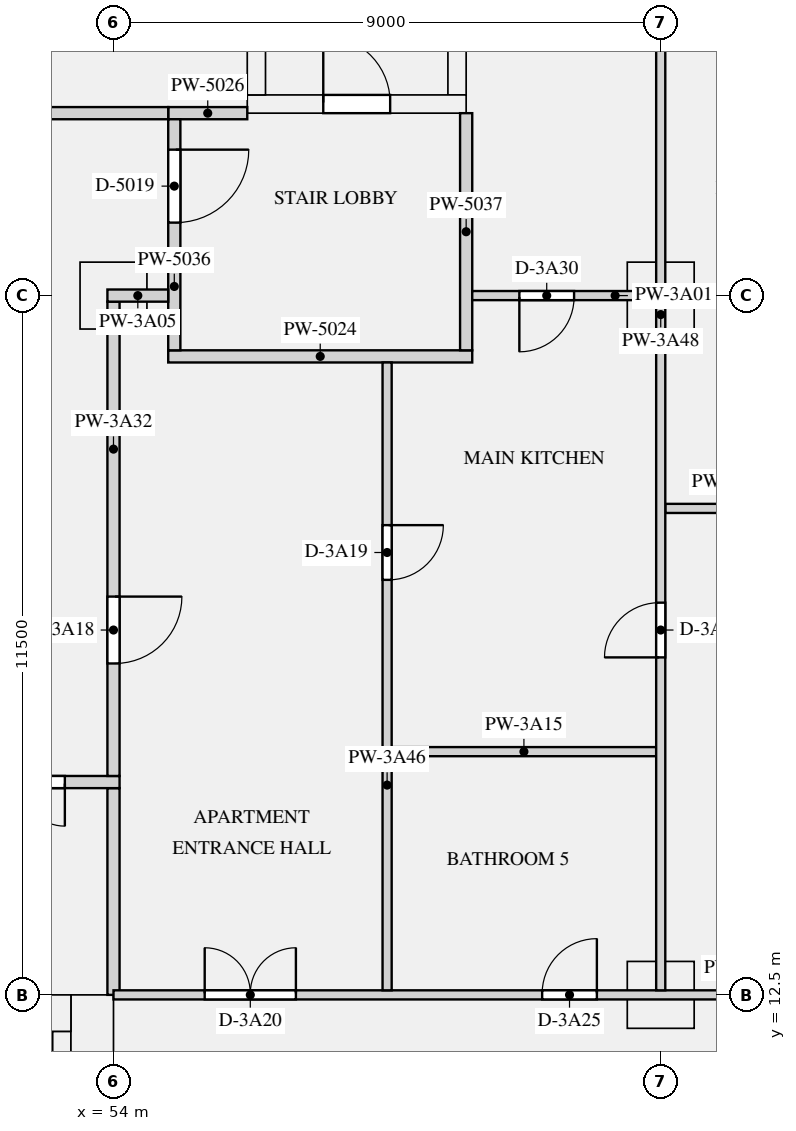
"""IFC4 building model, lengths in metres.
Left out: names, types, materials, properties, quantities, classifications, styles, units other than length and angle.
Written with IfcOpenShell. Run it as: python <this file> out.ifc"""

import sys

from ifc_helpers import new_model, si_unit, direction, frame, frame_2d, origin, origin_2d, place, context, subcontext, project, spatial, rectangle, extrude, element, fill, save


model = new_model("IFC4")
c1 = context("Model", 3, precision=1e-05, world=origin(), true_north=direction((0.0, 1.0)))
c2 = subcontext(c1, "Body", "Model", "MODEL_VIEW")
j1 = project(units=[si_unit("LENGTHUNIT", "METRE"), si_unit("PLANEANGLEUNIT", "RADIAN")], contexts=[c1])
p1 = place(None, origin())
s1 = spatial("IfcSite", under=j1, at=p1, CompositionType="ELEMENT")
p2 = place(p1, origin())
s2 = spatial("IfcBuilding", under=s1, at=p2, CompositionType="ELEMENT")
p3 = place(p2, frame((0.0, 0.0, 141.3)))
s3 = spatial("IfcBuildingStorey", under=s2, at=p3, CompositionType="ELEMENT", Elevation=141.3)
for number, where, z_axis, x_axis in (
    (1, (54.0, 24.0, 0.0), (0.0, 0.0, 1.0), (1.0, 0.0, 0.0)),
    (2, (63.0, 24.0, 0.0), (0.0, 0.0, 1.0), (1.0, 0.0, 0.0)),
    (3, (63.0, 12.5, 0.0), (0.0, 0.0, 1.0), (1.0, 0.0, 0.0)),
):
    element("IfcColumn", number, at=place(p3, frame(where, z_axis=z_axis, x_axis=x_axis)), inside=s3, PredefinedType="COLUMN", context=c2, shape_type="SweptSolid", body=[
        extrude(rectangle(XDim=1.1, YDim=1.1, at=origin_2d()), origin(), (0.0, 0.0, 1.0), 3.15),
    ])
p4 = place(p3, frame((53.65, 0.0, 0.0), z_axis=(0.0, 0.0, 1.0), x_axis=(0.0, 1.0, 0.0)))
e4 = element("IfcWall", 4, at=p4, inside=s3, PredefinedType="SHEAR", context=c2, shape_type="SweptSolid", body=[
    extrude(rectangle(XDim=12.5, YDim=0.7, at=frame_2d((6.25, 0.0))), origin(), (0.0, 0.0, 1.0), 3.15),
])
p5 = place(p3, frame((18.7, 12.2, 0.0), z_axis=(0.0, 0.0, 1.0), x_axis=(1.0, 0.0, 0.0)))
e5 = element("IfcWall", 5, at=p5, inside=s3, PredefinedType="SHEAR", context=c2, shape_type="SweptSolid", body=[
    extrude(rectangle(XDim=34.6, YDim=0.6, at=frame_2d((17.3, 0.0))), origin(), (0.0, 0.0, 1.0), 3.15),
])
p6 = place(p5, frame((24.475, 0.0, 0.0)))
e6 = element("IfcOpeningElement", 6, at=p6, cuts=e5, PredefinedType="OPENING", context=c2, shape_type="SweptSolid", body=[
    extrude(rectangle(XDim=1.1, YDim=2.1, at=frame_2d((0.55, 1.05))), frame((0.0, 0.31, 0.0), z_axis=(0.0, -1.0, 0.0), x_axis=(1.0, 0.0, 0.0)), (0.0, 0.0, 1.0), 0.62),
])
p7 = place(p5, frame((26.725, 0.0, 0.0)))
e7 = element("IfcOpeningElement", 7, at=p7, cuts=e5, PredefinedType="OPENING", context=c2, shape_type="SweptSolid", body=[
    extrude(rectangle(XDim=1.1, YDim=2.1, at=frame_2d((0.55, 1.05))), frame((0.0, 0.31, 0.0), z_axis=(0.0, -1.0, 0.0), x_axis=(1.0, 0.0, 0.0)), (0.0, 0.0, 1.0), 0.62),
])
p8 = place(p5, frame((28.975, 0.0, 0.0)))
e8 = element("IfcOpeningElement", 8, at=p8, cuts=e5, PredefinedType="OPENING", context=c2, shape_type="SweptSolid", body=[
    extrude(rectangle(XDim=1.1, YDim=2.1, at=frame_2d((0.55, 1.05))), frame((0.0, 0.31, 0.0), z_axis=(0.0, -1.0, 0.0), x_axis=(1.0, 0.0, 0.0)), (0.0, 0.0, 1.0), 0.62),
])
p9 = place(p5, frame((14.35, 0.0, 0.0)))
e9 = element("IfcOpeningElement", 9, at=p9, cuts=e5, PredefinedType="OPENING", context=c2, shape_type="SweptSolid", body=[
    extrude(rectangle(XDim=0.9, YDim=2.1, at=frame_2d((0.45, 1.05))), frame((0.0, 0.31, 0.0), z_axis=(0.0, -1.0, 0.0), x_axis=(1.0, 0.0, 0.0)), (0.0, 0.0, 1.0), 0.62),
])
p10 = place(p5, frame((1.45, 0.0, 0.0)))
e10 = element("IfcOpeningElement", 10, at=p10, cuts=e5, PredefinedType="OPENING", context=c2, shape_type="SweptSolid", body=[
    extrude(rectangle(XDim=1.2, YDim=2.1, at=frame_2d((0.6, 1.05))), frame((0.0, 0.31, 0.0), z_axis=(0.0, -1.0, 0.0), x_axis=(1.0, 0.0, 0.0)), (0.0, 0.0, 1.0), 0.62),
])
p11 = place(p5, frame((31.95, 0.0, 0.0)))
e11 = element("IfcOpeningElement", 11, at=p11, cuts=e5, PredefinedType="OPENING", context=c2, shape_type="SweptSolid", body=[
    extrude(rectangle(XDim=1.2, YDim=2.1, at=frame_2d((0.6, 1.05))), frame((0.0, 0.31, 0.0), z_axis=(0.0, -1.0, 0.0), x_axis=(1.0, 0.0, 0.0)), (0.0, 0.0, 1.0), 0.62),
])
p12 = place(p3, frame((53.15, 1.0, 0.0), z_axis=(0.0, 0.0, 1.0), x_axis=(0.0, 1.0, 0.0)))
e12 = element("IfcWall", 12, at=p12, inside=s3, PredefinedType="SHEAR", context=c2, shape_type="SweptSolid", body=[
    extrude(rectangle(XDim=10.9, YDim=0.3, at=frame_2d((5.45, 0.0))), origin(), (0.0, 0.0, 1.0), 3.15),
])
p13 = place(p3, frame((56.2, 27.15, 0.0), z_axis=(0.0, 0.0, 1.0), x_axis=(1.0, 0.0, 0.0)))
e13 = element("IfcWall", 13, at=p13, inside=s3, PredefinedType="SHEAR", context=c2, shape_type="SweptSolid", body=[
    extrude(rectangle(XDim=3.6, YDim=0.3, at=frame_2d((1.8, 0.0))), origin(), (0.0, 0.0, 1.0), 3.15),
])
p14 = place(p13, frame((1.25, 0.0, 0.0)))
e14 = element("IfcOpeningElement", 14, at=p14, cuts=e13, PredefinedType="OPENING", context=c2, shape_type="SweptSolid", body=[
    extrude(rectangle(XDim=1.1, YDim=2.1, at=frame_2d((0.55, 1.05))), frame((0.0, 0.16, 0.0), z_axis=(0.0, -1.0, 0.0), x_axis=(1.0, 0.0, 0.0)), (0.0, 0.0, 1.0), 0.32),
])
for number, where, z_axis, x_axis in (
    (15, (56.35, 27.3, 0.0), (0.0, 0.0, 1.0), (0.0, 1.0, 0.0)),
    (16, (59.65, 27.3, 0.0), (0.0, 0.0, 1.0), (0.0, 1.0, 0.0)),
):
    element("IfcWall", number, at=place(p3, frame(where, z_axis=z_axis, x_axis=x_axis)), inside=s3, PredefinedType="SHEAR", context=c2, shape_type="SweptSolid", body=[
        extrude(rectangle(XDim=7.8, YDim=0.3, at=frame_2d((3.9, 0.0))), origin(), (0.0, 0.0, 1.0), 3.15),
    ])
p15 = place(p3, frame((54.9, 23.0, 0.0), z_axis=(0.0, 0.0, 1.0), x_axis=(1.0, 0.0, 0.0)))
e17 = element("IfcWall", 17, at=p15, inside=s3, PredefinedType="PARTITIONING", context=c2, shape_type="SweptSolid", body=[
    extrude(rectangle(XDim=5.0, YDim=0.2, at=frame_2d((2.5, 0.0))), origin(), (0.0, 0.0, 1.0), 2.83),
])
p16 = place(p3, frame((54.9, 27.0, 0.0), z_axis=(0.0, 0.0, 1.0), x_axis=(1.0, 0.0, 0.0)))
e18 = element("IfcWall", 18, at=p16, inside=s3, PredefinedType="PARTITIONING", context=c2, shape_type="SweptSolid", body=[
    extrude(rectangle(XDim=1.3, YDim=0.2, at=frame_2d((0.65, 0.0))), origin(), (0.0, 0.0, 1.0), 2.83),
])
p17 = place(p3, frame((54.0, 12.5, 0.0), z_axis=(0.0, 0.0, 1.0), x_axis=(0.0, 1.0, 0.0)))
e19 = element("IfcWall", 19, at=p17, inside=s3, PredefinedType="PARTITIONING", context=c2, shape_type="SweptSolid", body=[
    extrude(rectangle(XDim=3.4, YDim=0.2, at=frame_2d((1.7, 0.0))), origin(), (0.0, 0.0, 1.0), 2.83),
])
p18 = place(p3, frame((55.0, 23.1, 0.0), z_axis=(0.0, 0.0, 1.0), x_axis=(0.0, 1.0, 0.0)))
e20 = element("IfcWall", 20, at=p18, inside=s3, PredefinedType="PARTITIONING", context=c2, shape_type="SweptSolid", body=[
    extrude(rectangle(XDim=3.8, YDim=0.2, at=frame_2d((1.9, 0.0))), origin(), (0.0, 0.0, 1.0), 2.83),
])
p19 = place(p18, frame((2.1, 0.0, 0.0)))
e21 = element("IfcOpeningElement", 21, at=p19, cuts=e20, PredefinedType="OPENING", context=c2, shape_type="SweptSolid", body=[
    extrude(rectangle(XDim=1.2, YDim=2.1, at=frame_2d((0.6, 1.05))), frame((0.0, 0.11, 0.0), z_axis=(0.0, -1.0, 0.0), x_axis=(1.0, 0.0, 0.0)), (0.0, 0.0, 1.0), 0.22),
])
p20 = place(p3, frame((59.8, 23.1, 0.0), z_axis=(0.0, 0.0, 1.0), x_axis=(0.0, 1.0, 0.0)))
e22 = element("IfcWall", 22, at=p20, inside=s3, PredefinedType="PARTITIONING", context=c2, shape_type="SweptSolid", body=[
    extrude(rectangle(XDim=3.9, YDim=0.2, at=frame_2d((1.95, 0.0))), origin(), (0.0, 0.0, 1.0), 2.83),
])
p21 = place(p3, frame((59.9, 24.0, 0.0), z_axis=(0.0, 0.0, 1.0), x_axis=(1.0, 0.0, 0.0)))
e23 = element("IfcWall", 23, at=p21, inside=s3, PredefinedType="PARTITIONING", context=c2, shape_type="SweptSolid", body=[
    extrude(rectangle(XDim=3.025, YDim=0.15, at=frame_2d((1.513, 0.0))), origin(), (0.0, 0.0, 1.0), 2.83),
])
p22 = place(p21, frame((0.775, 0.0, 0.0)))
e24 = element("IfcOpeningElement", 24, at=p22, cuts=e23, PredefinedType="OPENING", context=c2, shape_type="SweptSolid", body=[
    extrude(rectangle(XDim=0.9, YDim=2.1, at=frame_2d((0.45, 1.05))), frame((0.0, 0.085, 0.0), z_axis=(0.0, -1.0, 0.0), x_axis=(1.0, 0.0, 0.0)), (0.0, 0.0, 1.0), 0.17),
])
p23 = place(p3, frame((53.9, 24.0, 0.0), z_axis=(0.0, 0.0, 1.0), x_axis=(1.0, 0.0, 0.0)))
e25 = element("IfcWall", 25, at=p23, inside=s3, PredefinedType="PARTITIONING", context=c2, shape_type="SweptSolid", body=[
    extrude(rectangle(XDim=1.0, YDim=0.2, at=frame_2d((0.5, 0.0))), origin(), (0.0, 0.0, 1.0), 2.83),
])
p24 = place(p3, frame((47.925, 27.0, 0.0), z_axis=(0.0, 0.0, 1.0), x_axis=(1.0, 0.0, 0.0)))
e26 = element("IfcWall", 26, at=p24, inside=s3, PredefinedType="PARTITIONING", context=c2, shape_type="SweptSolid", body=[
    extrude(rectangle(XDim=6.975, YDim=0.2, at=frame_2d((3.487, 0.0))), origin(), (0.0, 0.0, 1.0), 2.83),
])
p25 = place(p3, frame((54.0, 12.5, 0.0), z_axis=(0.0, 0.0, 1.0), x_axis=(1.0, 0.0, 0.0)))
e27 = element("IfcWall", 27, at=p25, inside=s3, PredefinedType="PARTITIONING", context=c2, shape_type="SweptSolid", body=[
    extrude(rectangle(XDim=17.3, YDim=0.15, at=frame_2d((8.65, 0.0))), origin(), (0.0, 0.0, 1.0), 2.83),
])
p26 = place(p25, frame((1.5, 0.0, 0.0)))
e28 = element("IfcOpeningElement", 28, at=p26, cuts=e27, PredefinedType="OPENING", context=c2, shape_type="SweptSolid", body=[
    extrude(rectangle(XDim=1.5, YDim=2.1, at=frame_2d((0.75, 1.05))), frame((0.0, 0.085, 0.0), z_axis=(0.0, -1.0, 0.0), x_axis=(1.0, 0.0, 0.0)), (0.0, 0.0, 1.0), 0.17),
])
p27 = place(p25, frame((7.05, 0.0, 0.0)))
e29 = element("IfcOpeningElement", 29, at=p27, cuts=e27, PredefinedType="OPENING", context=c2, shape_type="SweptSolid", body=[
    extrude(rectangle(XDim=0.9, YDim=2.1, at=frame_2d((0.45, 1.05))), frame((0.0, 0.085, 0.0), z_axis=(0.0, -1.0, 0.0), x_axis=(1.0, 0.0, 0.0)), (0.0, 0.0, 1.0), 0.17),
])
p28 = place(p25, frame((12.75, 0.0, 0.0)))
e30 = element("IfcOpeningElement", 30, at=p28, cuts=e27, PredefinedType="OPENING", context=c2, shape_type="SweptSolid", body=[
    extrude(rectangle(XDim=1.5, YDim=2.1, at=frame_2d((0.75, 1.05))), frame((0.0, 0.085, 0.0), z_axis=(0.0, -1.0, 0.0), x_axis=(1.0, 0.0, 0.0)), (0.0, 0.0, 1.0), 0.17),
])
p29 = place(p3, frame((58.575, 16.5, 0.0), z_axis=(0.0, 0.0, 1.0), x_axis=(1.0, 0.0, 0.0)))
e31 = element("IfcWall", 31, at=p29, inside=s3, PredefinedType="PARTITIONING", context=c2, shape_type="SweptSolid", body=[
    extrude(rectangle(XDim=4.35, YDim=0.15, at=frame_2d((2.175, 0.0))), origin(), (0.0, 0.0, 1.0), 2.83),
])
p30 = place(p3, frame((63.075, 20.5, 0.0), z_axis=(0.0, 0.0, 1.0), x_axis=(1.0, 0.0, 0.0)))
e32 = element("IfcWall", 32, at=p30, inside=s3, PredefinedType="PARTITIONING", context=c2, shape_type="SweptSolid", body=[
    extrude(rectangle(XDim=5.725, YDim=0.15, at=frame_2d((2.863, 0.0))), origin(), (0.0, 0.0, 1.0), 2.83),
])
p31 = place(p30, frame((2.15, 0.0, 0.0)))
e33 = element("IfcOpeningElement", 33, at=p31, cuts=e32, PredefinedType="OPENING", context=c2, shape_type="SweptSolid", body=[
    extrude(rectangle(XDim=1.5, YDim=2.1, at=frame_2d((0.75, 1.05))), frame((0.0, 0.085, 0.0), z_axis=(0.0, -1.0, 0.0), x_axis=(1.0, 0.0, 0.0)), (0.0, 0.0, 1.0), 0.17),
])
p32 = place(p3, frame((17.9, 16.0, 0.0), z_axis=(0.0, 0.0, 1.0), x_axis=(1.0, 0.0, 0.0)))
e34 = element("IfcWall", 34, at=p32, inside=s3, PredefinedType="PARTITIONING", context=c2, shape_type="SweptSolid", body=[
    extrude(rectangle(XDim=36.2, YDim=0.2, at=frame_2d((18.1, 0.0))), origin(), (0.0, 0.0, 1.0), 2.83),
])
p33 = place(p32, frame((0.9, 0.0, 0.0)))
e35 = element("IfcOpeningElement", 35, at=p33, cuts=e34, PredefinedType="OPENING", context=c2, shape_type="SweptSolid", body=[
    extrude(rectangle(XDim=1.4, YDim=2.1, at=frame_2d((0.7, 1.05))), frame((0.0, 0.11, 0.0), z_axis=(0.0, -1.0, 0.0), x_axis=(1.0, 0.0, 0.0)), (0.0, 0.0, 1.0), 0.22),
])
p34 = place(p32, frame((33.9, 0.0, 0.0)))
e36 = element("IfcOpeningElement", 36, at=p34, cuts=e34, PredefinedType="OPENING", context=c2, shape_type="SweptSolid", body=[
    extrude(rectangle(XDim=1.4, YDim=2.1, at=frame_2d((0.7, 1.05))), frame((0.0, 0.11, 0.0), z_axis=(0.0, -1.0, 0.0), x_axis=(1.0, 0.0, 0.0)), (0.0, 0.0, 1.0), 0.22),
])
p35 = place(p3, frame((54.0, 16.1, 0.0), z_axis=(0.0, 0.0, 1.0), x_axis=(0.0, 1.0, 0.0)))
e37 = element("IfcWall", 37, at=p35, inside=s3, PredefinedType="PARTITIONING", context=c2, shape_type="SweptSolid", body=[
    extrude(rectangle(XDim=7.8, YDim=0.2, at=frame_2d((3.9, 0.0))), origin(), (0.0, 0.0, 1.0), 2.83),
])
p36 = place(p35, frame((1.85, 0.0, 0.0)))
e38 = element("IfcOpeningElement", 38, at=p36, cuts=e37, PredefinedType="OPENING", context=c2, shape_type="SweptSolid", body=[
    extrude(rectangle(XDim=1.1, YDim=2.1, at=frame_2d((0.55, 1.05))), frame((0.0, 0.11, 0.0), z_axis=(0.0, -1.0, 0.0), x_axis=(1.0, 0.0, 0.0)), (0.0, 0.0, 1.0), 0.22),
])
p37 = place(p3, frame((58.5, 12.575, 0.0), z_axis=(0.0, 0.0, 1.0), x_axis=(0.0, 1.0, 0.0)))
e39 = element("IfcWall", 39, at=p37, inside=s3, PredefinedType="PARTITIONING", context=c2, shape_type="SweptSolid", body=[
    extrude(rectangle(XDim=10.325, YDim=0.15, at=frame_2d((5.163, 0.0))), origin(), (0.0, 0.0, 1.0), 2.83),
])
p38 = place(p37, frame((6.75, 0.0, 0.0)))
e40 = element("IfcOpeningElement", 40, at=p38, cuts=e39, PredefinedType="OPENING", context=c2, shape_type="SweptSolid", body=[
    extrude(rectangle(XDim=0.9, YDim=2.1, at=frame_2d((0.45, 1.05))), frame((0.0, 0.085, 0.0), z_axis=(0.0, -1.0, 0.0), x_axis=(1.0, 0.0, 0.0)), (0.0, 0.0, 1.0), 0.17),
])
p39 = place(p3, frame((63.0, 12.575, 0.0), z_axis=(0.0, 0.0, 1.0), x_axis=(0.0, 1.0, 0.0)))
e41 = element("IfcWall", 41, at=p39, inside=s3, PredefinedType="PARTITIONING", context=c2, shape_type="SweptSolid", body=[
    extrude(rectangle(XDim=15.85, YDim=0.15, at=frame_2d((7.925, 0.0))), origin(), (0.0, 0.0, 1.0), 2.83),
])
p40 = place(p39, frame((5.475, 0.0, 0.0)))
e42 = element("IfcOpeningElement", 42, at=p40, cuts=e41, PredefinedType="OPENING", context=c2, shape_type="SweptSolid", body=[
    extrude(rectangle(XDim=0.9, YDim=2.1, at=frame_2d((0.45, 1.05))), frame((0.0, 0.085, 0.0), z_axis=(0.0, -1.0, 0.0), x_axis=(1.0, 0.0, 0.0)), (0.0, 0.0, 1.0), 0.17),
])
p41 = place(p14, origin())
e43 = element("IfcDoor", 43, at=p41, inside=s3, OperationType="SINGLE_SWING_LEFT", PredefinedType="DOOR", context=c2, shape_type="SweptSolid", body=[
    extrude(rectangle(XDim=1.1, YDim=2.1, at=frame_2d((0.55, 1.05))), frame((0.0, 0.025, 0.0), z_axis=(0.0, -1.0, 0.0), x_axis=(1.0, 0.0, 0.0)), (0.0, 0.0, 1.0), 0.05),
])
fill(e14, e43)
p42 = place(p19, frame((1.2, 0.0, 0.0), z_axis=(0.0, 0.0, 1.0), x_axis=(-1.0, 0.0, 0.0)))
e44 = element("IfcDoor", 44, at=p42, inside=s3, OperationType="SINGLE_SWING_LEFT", PredefinedType="DOOR", context=c2, shape_type="SweptSolid", body=[
    extrude(rectangle(XDim=1.2, YDim=2.1, at=frame_2d((0.6, 1.05))), frame((0.0, 0.025, 0.0), z_axis=(0.0, -1.0, 0.0), x_axis=(1.0, 0.0, 0.0)), (0.0, 0.0, 1.0), 0.05),
])
fill(e21, e44)
p43 = place(p34, frame((1.4, 0.0, 0.0), z_axis=(0.0, 0.0, 1.0), x_axis=(-1.0, 0.0, 0.0)))
e45 = element("IfcDoor", 45, at=p43, inside=s3, OperationType="DOUBLE_DOOR_SINGLE_SWING", PredefinedType="DOOR", context=c2, shape_type="SweptSolid", body=[
    extrude(rectangle(XDim=1.4, YDim=2.1, at=frame_2d((0.7, 1.05))), frame((0.0, 0.025, 0.0), z_axis=(0.0, -1.0, 0.0), x_axis=(1.0, 0.0, 0.0)), (0.0, 0.0, 1.0), 0.05),
])
fill(e36, e45)
p44 = place(p36, frame((1.1, 0.0, 0.0), z_axis=(0.0, 0.0, 1.0), x_axis=(-1.0, 0.0, 0.0)))
e46 = element("IfcDoor", 46, at=p44, inside=s3, OperationType="SINGLE_SWING_LEFT", PredefinedType="DOOR", context=c2, shape_type="SweptSolid", body=[
    extrude(rectangle(XDim=1.1, YDim=2.1, at=frame_2d((0.55, 1.05))), frame((0.0, 0.025, 0.0), z_axis=(0.0, -1.0, 0.0), x_axis=(1.0, 0.0, 0.0)), (0.0, 0.0, 1.0), 0.05),
])
fill(e38, e46)
p45 = place(p38, frame((0.9, 0.0, 0.0), z_axis=(0.0, 0.0, 1.0), x_axis=(-1.0, 0.0, 0.0)))
e47 = element("IfcDoor", 47, at=p45, inside=s3, OperationType="SINGLE_SWING_LEFT", PredefinedType="DOOR", context=c2, shape_type="SweptSolid", body=[
    extrude(rectangle(XDim=0.9, YDim=2.1, at=frame_2d((0.45, 1.05))), frame((0.0, 0.025, 0.0), z_axis=(0.0, -1.0, 0.0), x_axis=(1.0, 0.0, 0.0)), (0.0, 0.0, 1.0), 0.05),
])
fill(e40, e47)
p46 = place(p26, origin())
e48 = element("IfcDoor", 48, at=p46, inside=s3, OperationType="DOUBLE_DOOR_SINGLE_SWING", PredefinedType="DOOR", context=c2, shape_type="SweptSolid", body=[
    extrude(rectangle(XDim=1.5, YDim=2.1, at=frame_2d((0.75, 1.05))), frame((0.0, 0.025, 0.0), z_axis=(0.0, -1.0, 0.0), x_axis=(1.0, 0.0, 0.0)), (0.0, 0.0, 1.0), 0.05),
])
fill(e28, e48)
p47 = place(p27, origin())
e49 = element("IfcDoor", 49, at=p47, inside=s3, OperationType="SINGLE_SWING_RIGHT", PredefinedType="DOOR", context=c2, shape_type="SweptSolid", body=[
    extrude(rectangle(XDim=0.9, YDim=2.1, at=frame_2d((0.45, 1.05))), frame((0.0, 0.025, 0.0), z_axis=(0.0, -1.0, 0.0), x_axis=(1.0, 0.0, 0.0)), (0.0, 0.0, 1.0), 0.05),
])
fill(e29, e49)
p48 = place(p40, origin())
e50 = element("IfcDoor", 50, at=p48, inside=s3, OperationType="SINGLE_SWING_LEFT", PredefinedType="DOOR", context=c2, shape_type="SweptSolid", body=[
    extrude(rectangle(XDim=0.9, YDim=2.1, at=frame_2d((0.45, 1.05))), frame((0.0, 0.025, 0.0), z_axis=(0.0, -1.0, 0.0), x_axis=(1.0, 0.0, 0.0)), (0.0, 0.0, 1.0), 0.05),
])
fill(e42, e50)
p49 = place(p22, frame((0.9, 0.0, 0.0), z_axis=(0.0, 0.0, 1.0), x_axis=(-1.0, 0.0, 0.0)))
e51 = element("IfcDoor", 51, at=p49, inside=s3, OperationType="SINGLE_SWING_RIGHT", PredefinedType="DOOR", context=c2, shape_type="SweptSolid", body=[
    extrude(rectangle(XDim=0.9, YDim=2.1, at=frame_2d((0.45, 1.05))), frame((0.0, 0.025, 0.0), z_axis=(0.0, -1.0, 0.0), x_axis=(1.0, 0.0, 0.0)), (0.0, 0.0, 1.0), 0.05),
])
fill(e24, e51)
save(model, sys.argv[1])
